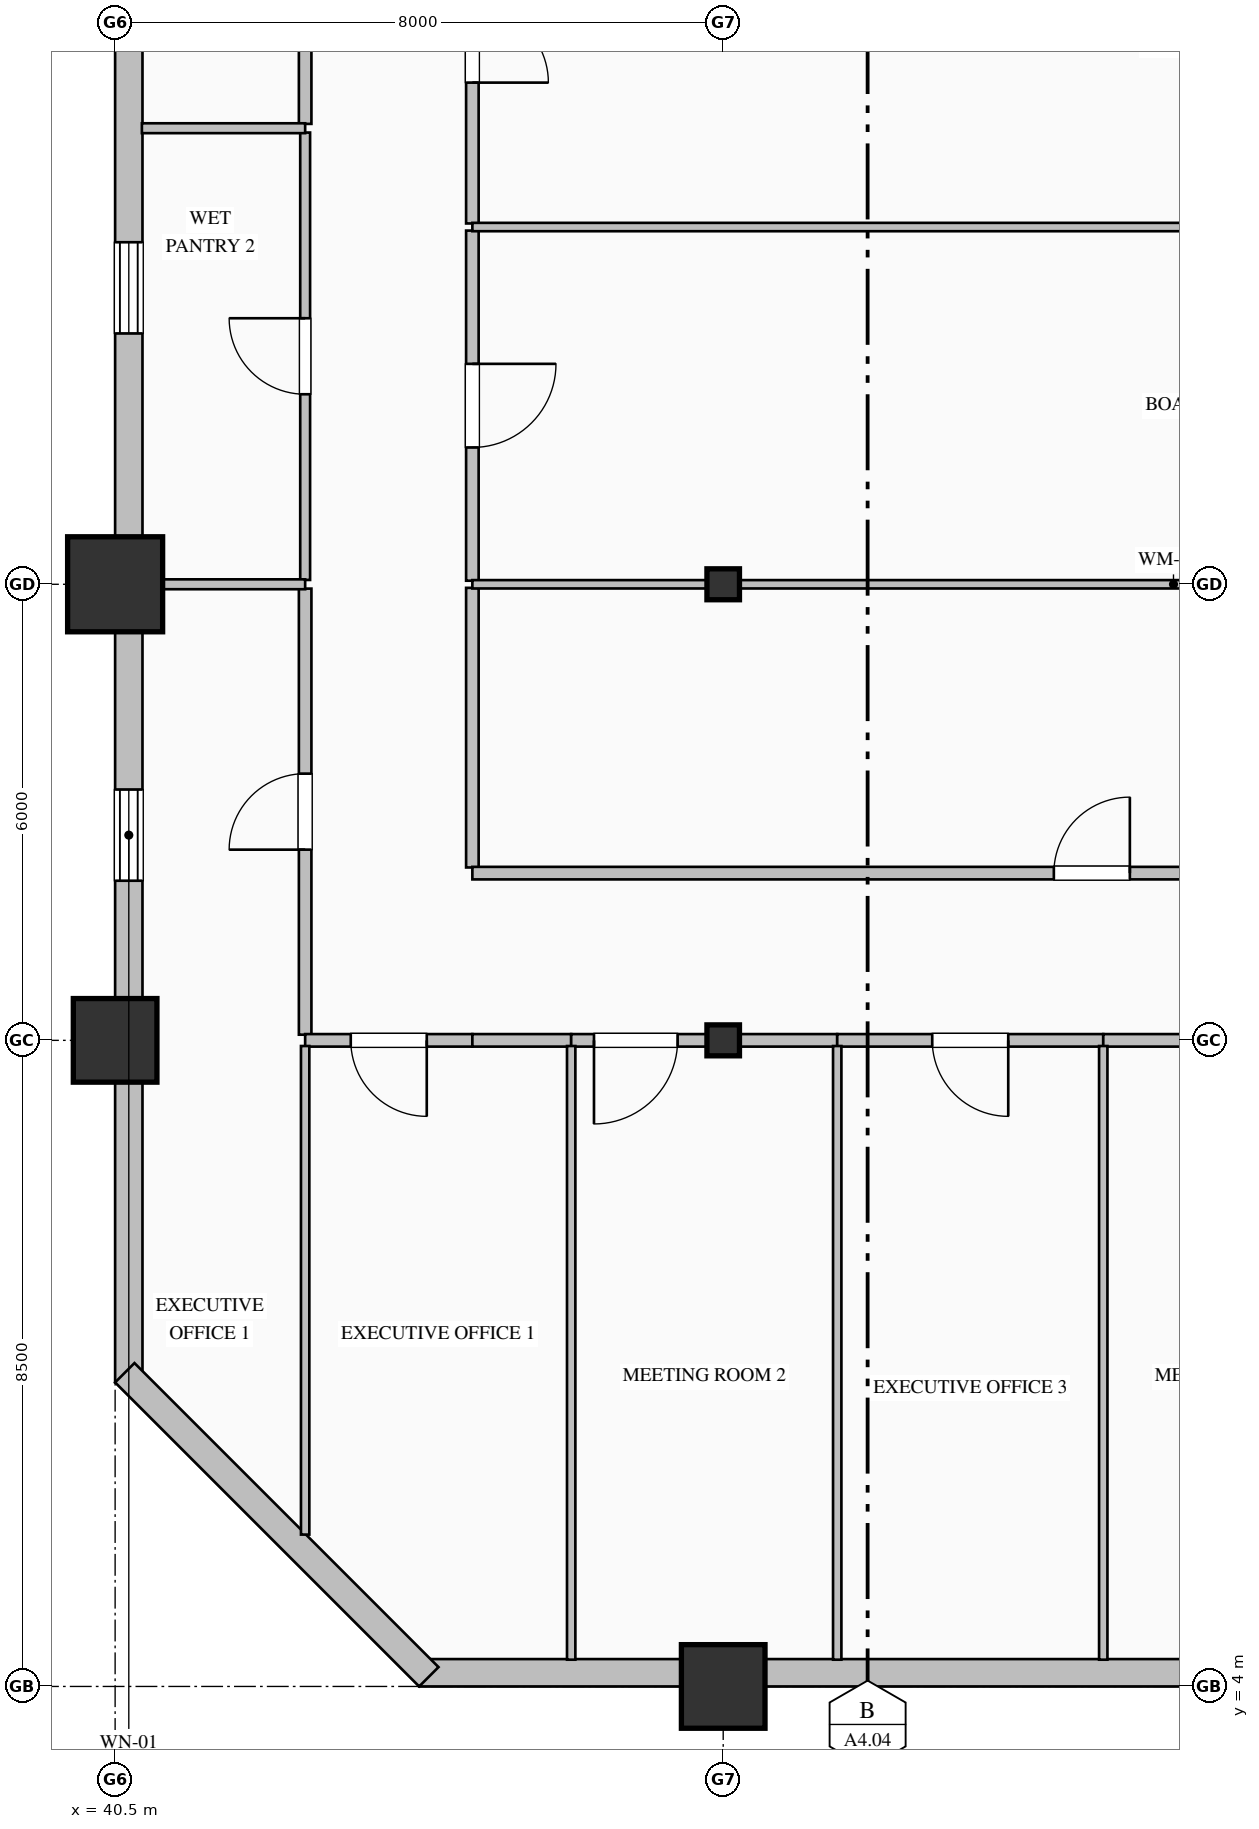
"""IFC4 building model, lengths in metres.
Left out: names, types, materials, properties, quantities, classifications, styles, units other than length and angle.
Written with IfcOpenShell. Run it as: python <this file> out.ifc"""

import sys

from ifc_helpers import new_model, si_unit, direction, frame, frame_2d, origin, origin_2d, place, context, subcontext, project, spatial, rectangle, hollow_rectangle, i_section, extrude, element, fill, save


model = new_model("IFC4")
c1 = context("Model", 3, precision=1e-05, world=origin(), true_north=direction((0.0, 1.0)))
c2 = subcontext(c1, "Body", "Model", "MODEL_VIEW")
j1 = project(units=[si_unit("LENGTHUNIT", "METRE"), si_unit("PLANEANGLEUNIT", "RADIAN")], contexts=[c1])
p1 = place(None, origin())
s1 = spatial("IfcSite", under=j1, at=p1, CompositionType="ELEMENT")
p2 = place(p1, origin())
s2 = spatial("IfcBuilding", under=s1, at=p2, CompositionType="ELEMENT")
p3 = place(p2, frame((0.0, 0.0, 32.2)))
s3 = spatial("IfcBuildingStorey", under=s2, at=p3, CompositionType="ELEMENT", Elevation=32.2)
p4 = place(p3, frame((40.5, 12.5, 0.0), z_axis=(0.0, 0.0, 1.0), x_axis=(1.0, 0.0, 0.0)))
e1 = element("IfcColumn", 1, at=p4, inside=s3, PredefinedType="COLUMN", context=c2, shape_type="SweptSolid", body=[
    extrude(hollow_rectangle(XDim=1.1, YDim=1.1, WallThickness=0.04, at=origin_2d()), origin(), (0.0, 0.0, 1.0), 4.0),
])
p5 = place(p3, frame((40.5, 18.5, 0.0), z_axis=(0.0, 0.0, 1.0), x_axis=(1.0, 0.0, 0.0)))
e2 = element("IfcColumn", 2, at=p5, inside=s3, PredefinedType="COLUMN", context=c2, shape_type="SweptSolid", body=[
    extrude(hollow_rectangle(XDim=1.25, YDim=1.25, WallThickness=0.045, at=origin_2d()), origin(), (0.0, 0.0, 1.0), 4.0),
])
p6 = place(p3, frame((48.5, 4.0, 0.0), z_axis=(0.0, 0.0, 1.0), x_axis=(1.0, 0.0, 0.0)))
e3 = element("IfcColumn", 3, at=p6, inside=s3, PredefinedType="COLUMN", context=c2, shape_type="SweptSolid", body=[
    extrude(hollow_rectangle(XDim=1.1, YDim=1.1, WallThickness=0.04, at=origin_2d()), origin(), (0.0, 0.0, 1.0), 4.0),
])
for number, where, z_axis, x_axis in (
    (4, (48.5, 12.5, 0.0), (0.0, 0.0, 1.0), (1.0, 0.0, 0.0)),
    (5, (48.5, 18.5, 0.0), (0.0, 0.0, 1.0), (1.0, 0.0, 0.0)),
):
    element("IfcColumn", number, at=place(p3, frame(where, z_axis=z_axis, x_axis=x_axis)), inside=s3, PredefinedType="COLUMN", context=c2, shape_type="SweptSolid", body=[
        extrude(i_section(OverallWidth=0.407, OverallDepth=0.428, WebThickness=0.02, FlangeThickness=0.035, FilletRadius=0.022, at=origin_2d()), origin(), (0.0, 0.0, 1.0), 4.0),
    ])
p7 = place(p3, frame((40.68, 8.0, 0.0), z_axis=(0.0, 0.0, 1.0), x_axis=(0.0, 1.0, 0.0)))
e6 = element("IfcWall", 6, at=p7, inside=s3, PredefinedType="SOLIDWALL", context=c2, shape_type="SweptSolid", body=[
    extrude(rectangle(XDim=20.36, YDim=0.36, at=frame_2d((10.18, 0.0))), origin(), (0.0, 0.0, 1.0), 3.05),
])
p8 = place(p7, frame((6.6, 0.0, 0.7)))
e7 = element("IfcOpeningElement", 7, at=p8, cuts=e6, PredefinedType="OPENING", context=c2, shape_type="SweptSolid", body=[
    extrude(rectangle(XDim=1.2, YDim=1.85, at=frame_2d((0.6, 0.925))), frame((0.0, 0.19, 0.0), z_axis=(0.0, -1.0, 0.0), x_axis=(1.0, 0.0, 0.0)), (0.0, 0.0, 1.0), 0.38),
])
p9 = place(p7, frame((13.8, 0.0, 0.7)))
e8 = element("IfcOpeningElement", 8, at=p9, cuts=e6, PredefinedType="OPENING", context=c2, shape_type="SweptSolid", body=[
    extrude(rectangle(XDim=1.2, YDim=1.85, at=frame_2d((0.6, 0.925))), frame((0.0, 0.19, 0.0), z_axis=(0.0, -1.0, 0.0), x_axis=(1.0, 0.0, 0.0)), (0.0, 0.0, 1.0), 0.38),
])
p10 = place(p3, frame((60.0, 4.18, 0.0), z_axis=(0.0, 0.0, 1.0), x_axis=(-1.0, 0.0, 0.0)))
e9 = element("IfcWall", 9, at=p10, inside=s3, PredefinedType="SOLIDWALL", context=c2, shape_type="SweptSolid", body=[
    extrude(rectangle(XDim=15.5, YDim=0.36, at=frame_2d((7.75, 0.0))), origin(), (0.0, 0.0, 1.0), 3.25),
])
p11 = place(p3, frame((44.627, 4.127, 0.0), z_axis=(0.0, 0.0, 1.0), x_axis=(-0.707106781187, 0.707106781187, 0.0)))
e10 = element("IfcWall", 10, at=p11, inside=s3, PredefinedType="SOLIDWALL", context=c2, shape_type="SweptSolid", body=[
    extrude(rectangle(XDim=5.657, YDim=0.36, at=frame_2d((2.828, 0.0))), origin(), (0.0, 0.0, 1.0), 3.75),
])
p12 = place(p3, frame((45.2, 18.453, 0.0), z_axis=(0.0, 0.0, 1.0), x_axis=(0.0, -1.0, 0.0)))
e11 = element("IfcWall", 11, at=p12, inside=s3, PredefinedType="PARTITIONING", context=c2, shape_type="SweptSolid", body=[
    extrude(rectangle(XDim=3.678, YDim=0.165, at=frame_2d((1.839, 0.0))), origin(), (0.0, 0.0, 1.0), 3.75),
])
p13 = place(p3, frame((45.2, 23.153, 0.0), z_axis=(0.0, 0.0, 1.0), x_axis=(0.0, -1.0, 0.0)))
e12 = element("IfcWall", 12, at=p13, inside=s3, PredefinedType="PARTITIONING", context=c2, shape_type="SweptSolid", body=[
    extrude(rectangle(XDim=4.606, YDim=0.165, at=frame_2d((2.303, 0.0))), origin(), (0.0, 0.0, 1.0), 3.75),
])
p14 = place(p13, frame((1.753, 0.0, 0.0)))
e13 = element("IfcOpeningElement", 13, at=p14, cuts=e12, PredefinedType="OPENING", context=c2, shape_type="SweptSolid", body=[
    extrude(rectangle(XDim=1.1, YDim=2.2, at=frame_2d((0.55, 1.1))), frame((0.0, 0.093, 0.0), z_axis=(0.0, -1.0, 0.0), x_axis=(1.0, 0.0, 0.0)), (0.0, 0.0, 1.0), 0.185),
])
p15 = place(p3, frame((45.2, 27.953, 0.0), z_axis=(0.0, 0.0, 1.0), x_axis=(0.0, -1.0, 0.0)))
e14 = element("IfcWall", 14, at=p15, inside=s3, PredefinedType="PARTITIONING", context=c2, shape_type="SweptSolid", body=[
    extrude(rectangle(XDim=4.706, YDim=0.165, at=frame_2d((2.353, 0.0))), origin(), (0.0, 0.0, 1.0), 3.75),
])
p16 = place(p15, frame((1.853, 0.0, 0.0)))
e15 = element("IfcOpeningElement", 15, at=p16, cuts=e14, PredefinedType="OPENING", context=c2, shape_type="SweptSolid", body=[
    extrude(rectangle(XDim=1.0, YDim=2.15, at=frame_2d((0.5, 1.075))), frame((0.0, 0.093, 0.0), z_axis=(0.0, -1.0, 0.0), x_axis=(1.0, 0.0, 0.0)), (0.0, 0.0, 1.0), 0.185),
])
p17 = place(p3, frame((43.0, 12.574, 0.0), z_axis=(0.0, 0.0, 1.0), x_axis=(0.0, 1.0, 0.0)))
e16 = element("IfcWall", 16, at=p17, inside=s3, PredefinedType="PARTITIONING", context=c2, shape_type="SweptSolid", body=[
    extrude(rectangle(XDim=5.869, YDim=0.165, at=frame_2d((2.934, 0.0))), origin(), (0.0, 0.0, 1.0), 3.75),
])
p18 = place(p17, frame((2.434, 0.0, 0.0)))
e17 = element("IfcOpeningElement", 17, at=p18, cuts=e16, PredefinedType="OPENING", context=c2, shape_type="SweptSolid", body=[
    extrude(rectangle(XDim=1.0, YDim=2.15, at=frame_2d((0.5, 1.075))), frame((0.0, 0.093, 0.0), z_axis=(0.0, -1.0, 0.0), x_axis=(1.0, 0.0, 0.0)), (0.0, 0.0, 1.0), 0.185),
])
p19 = place(p3, frame((43.0, 18.557, 0.0), z_axis=(0.0, 0.0, 1.0), x_axis=(0.0, 1.0, 0.0)))
e18 = element("IfcWall", 18, at=p19, inside=s3, PredefinedType="PARTITIONING", context=c2, shape_type="SweptSolid", body=[
    extrude(rectangle(XDim=5.886, YDim=0.13, at=frame_2d((2.943, 0.0))), origin(), (0.0, 0.0, 1.0), 3.75),
])
p20 = place(p19, frame((2.443, 0.0, 0.0)))
e19 = element("IfcOpeningElement", 19, at=p20, cuts=e18, PredefinedType="OPENING", context=c2, shape_type="SweptSolid", body=[
    extrude(rectangle(XDim=1.0, YDim=2.15, at=frame_2d((0.5, 1.075))), frame((0.0, 0.075, 0.0), z_axis=(0.0, -1.0, 0.0), x_axis=(1.0, 0.0, 0.0)), (0.0, 0.0, 1.0), 0.15),
])
p21 = place(p3, frame((43.0, 24.557, 0.0), z_axis=(0.0, 0.0, 1.0), x_axis=(0.0, 1.0, 0.0)))
e20 = element("IfcWall", 20, at=p21, inside=s3, PredefinedType="PARTITIONING", context=c2, shape_type="SweptSolid", body=[
    extrude(rectangle(XDim=3.396, YDim=0.165, at=frame_2d((1.698, 0.0))), origin(), (0.0, 0.0, 1.0), 3.75),
])
p22 = place(p21, frame((1.198, 0.0, 0.0)))
e21 = element("IfcOpeningElement", 21, at=p22, cuts=e20, PredefinedType="OPENING", context=c2, shape_type="SweptSolid", body=[
    extrude(rectangle(XDim=1.0, YDim=2.15, at=frame_2d((0.5, 1.075))), frame((0.0, 0.093, 0.0), z_axis=(0.0, -1.0, 0.0), x_axis=(1.0, 0.0, 0.0)), (0.0, 0.0, 1.0), 0.185),
])
p23 = place(p3, frame((45.2, 12.5, 0.0), z_axis=(0.0, 0.0, 1.0), x_axis=(-1.0, 0.0, 0.0)))
e22 = element("IfcWall", 22, at=p23, inside=s3, PredefinedType="PARTITIONING", context=c2, shape_type="SweptSolid", body=[
    extrude(rectangle(XDim=2.2, YDim=0.165, at=frame_2d((1.1, 0.0))), origin(), (0.0, 0.0, 1.0), 3.042),
])
p24 = place(p23, frame((0.6, 0.0, 0.0)))
e23 = element("IfcOpeningElement", 23, at=p24, cuts=e22, PredefinedType="OPENING", context=c2, shape_type="SweptSolid", body=[
    extrude(rectangle(XDim=1.0, YDim=2.15, at=frame_2d((0.5, 1.075))), frame((0.0, 0.093, 0.0), z_axis=(0.0, -1.0, 0.0), x_axis=(1.0, 0.0, 0.0)), (0.0, 0.0, 1.0), 0.185),
])
p25 = place(p3, frame((45.2, 14.7, 0.0), z_axis=(0.0, 0.0, 1.0), x_axis=(1.0, 0.0, 0.0)))
e24 = element("IfcWall", 24, at=p25, inside=s3, PredefinedType="PARTITIONING", context=c2, shape_type="SweptSolid", body=[
    extrude(rectangle(XDim=16.3, YDim=0.165, at=frame_2d((8.15, 0.0))), origin(), (0.0, 0.0, 1.0), 3.75),
])
p26 = place(p25, frame((7.65, 0.0, 0.0)))
e25 = element("IfcOpeningElement", 25, at=p26, cuts=e24, PredefinedType="OPENING", context=c2, shape_type="SweptSolid", body=[
    extrude(rectangle(XDim=1.0, YDim=2.15, at=frame_2d((0.5, 1.075))), frame((0.0, 0.093, 0.0), z_axis=(0.0, -1.0, 0.0), x_axis=(1.0, 0.0, 0.0)), (0.0, 0.0, 1.0), 0.185),
])
p27 = place(p3, frame((46.5, 12.5, 0.0), z_axis=(0.0, 0.0, 1.0), x_axis=(-1.0, 0.0, 0.0)))
e26 = element("IfcWall", 26, at=p27, inside=s3, PredefinedType="PARTITIONING", context=c2, shape_type="SweptSolid", body=[
    extrude(rectangle(XDim=1.3, YDim=0.165, at=frame_2d((0.65, 0.0))), origin(), (0.0, 0.0, 1.0), 3.042),
])
p28 = place(p3, frame((50.0, 12.5, 0.0), z_axis=(0.0, 0.0, 1.0), x_axis=(-1.0, 0.0, 0.0)))
e27 = element("IfcWall", 27, at=p28, inside=s3, PredefinedType="PARTITIONING", context=c2, shape_type="SweptSolid", body=[
    extrude(rectangle(XDim=3.5, YDim=0.165, at=frame_2d((1.75, 0.0))), origin(), (0.0, 0.0, 1.0), 3.042),
])
p29 = place(p28, frame((2.1, 0.0, 0.0)))
e28 = element("IfcOpeningElement", 28, at=p29, cuts=e27, PredefinedType="OPENING", context=c2, shape_type="SweptSolid", body=[
    extrude(rectangle(XDim=1.1, YDim=2.2, at=frame_2d((0.55, 1.1))), frame((0.0, 0.093, 0.0), z_axis=(0.0, -1.0, 0.0), x_axis=(1.0, 0.0, 0.0)), (0.0, 0.0, 1.0), 0.185),
])
p30 = place(p3, frame((53.5, 12.5, 0.0), z_axis=(0.0, 0.0, 1.0), x_axis=(-1.0, 0.0, 0.0)))
e29 = element("IfcWall", 29, at=p30, inside=s3, PredefinedType="PARTITIONING", context=c2, shape_type="SweptSolid", body=[
    extrude(rectangle(XDim=3.5, YDim=0.165, at=frame_2d((1.75, 0.0))), origin(), (0.0, 0.0, 1.0), 3.042),
])
p31 = place(p30, frame((1.25, 0.0, 0.0)))
e30 = element("IfcOpeningElement", 30, at=p31, cuts=e29, PredefinedType="OPENING", context=c2, shape_type="SweptSolid", body=[
    extrude(rectangle(XDim=1.0, YDim=2.15, at=frame_2d((0.5, 1.075))), frame((0.0, 0.093, 0.0), z_axis=(0.0, -1.0, 0.0), x_axis=(1.0, 0.0, 0.0)), (0.0, 0.0, 1.0), 0.185),
])
p32 = place(p3, frame((57.0, 12.5, 0.0), z_axis=(0.0, 0.0, 1.0), x_axis=(-1.0, 0.0, 0.0)))
e31 = element("IfcWall", 31, at=p32, inside=s3, PredefinedType="PARTITIONING", context=c2, shape_type="SweptSolid", body=[
    extrude(rectangle(XDim=3.5, YDim=0.165, at=frame_2d((1.75, 0.0))), origin(), (0.0, 0.0, 1.0), 3.042),
])
p33 = place(p32, frame((1.2, 0.0, 0.0)))
e32 = element("IfcOpeningElement", 32, at=p33, cuts=e31, PredefinedType="OPENING", context=c2, shape_type="SweptSolid", body=[
    extrude(rectangle(XDim=1.1, YDim=2.2, at=frame_2d((0.55, 1.1))), frame((0.0, 0.093, 0.0), z_axis=(0.0, -1.0, 0.0), x_axis=(1.0, 0.0, 0.0)), (0.0, 0.0, 1.0), 0.185),
])
p34 = place(p3, frame((45.2, 18.5, 0.0), z_axis=(0.0, 0.0, 1.0), x_axis=(1.0, 0.0, 0.0)))
e33 = element("IfcWall", 33, at=p34, inside=s3, PredefinedType="MOVABLE", context=c2, shape_type="SweptSolid", body=[
    extrude(rectangle(XDim=18.448, YDim=0.11, at=frame_2d((9.224, 0.0))), origin(), (0.0, 0.0, 1.0), 3.042),
])
p35 = place(p3, frame((45.2, 23.2, 0.0), z_axis=(0.0, 0.0, 1.0), x_axis=(1.0, 0.0, 0.0)))
e34 = element("IfcWall", 34, at=p35, inside=s3, PredefinedType="MOVABLE", context=c2, shape_type="SweptSolid", body=[
    extrude(rectangle(XDim=18.448, YDim=0.11, at=frame_2d((9.224, 0.0))), origin(), (0.0, 0.0, 1.0), 3.342),
])
p36 = place(p3, frame((40.852, 18.5, 0.0), z_axis=(0.0, 0.0, 1.0), x_axis=(1.0, 0.0, 0.0)))
e35 = element("IfcWall", 35, at=p36, inside=s3, PredefinedType="PARTITIONING", context=c2, shape_type="SweptSolid", body=[
    extrude(rectangle(XDim=2.148, YDim=0.13, at=frame_2d((1.074, 0.0))), origin(), (0.0, 0.0, 1.0), 3.042),
])
p37 = place(p3, frame((43.0, 12.426, 0.0), z_axis=(0.0, 0.0, 1.0), x_axis=(0.0, -1.0, 0.0)))
e36 = element("IfcWall", 36, at=p37, inside=s3, PredefinedType="MOVABLE", context=c2, shape_type="SweptSolid", body=[
    extrude(rectangle(XDim=6.428, YDim=0.11, at=frame_2d((3.214, 0.0))), origin(), (0.0, 0.0, 1.0), 3.75),
])
p38 = place(p3, frame((40.852, 24.5, 0.0), z_axis=(0.0, 0.0, 1.0), x_axis=(1.0, 0.0, 0.0)))
e37 = element("IfcWall", 37, at=p38, inside=s3, PredefinedType="PARTITIONING", context=c2, shape_type="SweptSolid", body=[
    extrude(rectangle(XDim=2.148, YDim=0.13, at=frame_2d((1.074, 0.0))), origin(), (0.0, 0.0, 1.0), 3.75),
])
for number, where, z_axis, x_axis in (
    (38, (46.5, 12.426, 0.0), (0.0, 0.0, 1.0), (0.0, -1.0, 0.0)),
    (39, (50.0, 12.426, 0.0), (0.0, 0.0, 1.0), (0.0, -1.0, 0.0)),
    (40, (53.5, 12.426, 0.0), (0.0, 0.0, 1.0), (0.0, -1.0, 0.0)),
):
    element("IfcWall", number, at=place(p3, frame(where, z_axis=z_axis, x_axis=x_axis)), inside=s3, PredefinedType="MOVABLE", context=c2, shape_type="SweptSolid", body=[
        extrude(rectangle(XDim=8.073, YDim=0.11, at=frame_2d((4.037, 0.0))), origin(), (0.0, 0.0, 1.0), 3.75),
    ])
p39 = place(p8, origin())
e41 = element("IfcWindow", 41, at=p39, inside=s3, PartitioningType="DOUBLE_PANEL_VERTICAL", PredefinedType="WINDOW", context=c2, shape_type="SweptSolid", body=[
    extrude(rectangle(XDim=1.2, YDim=1.85, at=frame_2d((0.6, 0.925))), frame((0.0, 0.15, 0.0), z_axis=(0.0, -1.0, 0.0), x_axis=(1.0, 0.0, 0.0)), (0.0, 0.0, 1.0), 0.06),
])
fill(e7, e41)
p40 = place(p9, origin())
e42 = element("IfcWindow", 42, at=p40, inside=s3, PartitioningType="DOUBLE_PANEL_VERTICAL", PredefinedType="WINDOW", context=c2, shape_type="SweptSolid", body=[
    extrude(rectangle(XDim=1.2, YDim=1.85, at=frame_2d((0.6, 0.925))), frame((0.0, 0.15, 0.0), z_axis=(0.0, -1.0, 0.0), x_axis=(1.0, 0.0, 0.0)), (0.0, 0.0, 1.0), 0.06),
])
fill(e8, e42)
p41 = place(p26, origin())
e43 = element("IfcDoor", 43, at=p41, inside=s3, OperationType="SINGLE_SWING_RIGHT", PredefinedType="DOOR", context=c2, shape_type="SweptSolid", body=[
    extrude(rectangle(XDim=1.0, YDim=2.15, at=frame_2d((0.5, 1.075))), frame((0.0, 0.025, 0.0), z_axis=(0.0, -1.0, 0.0), x_axis=(1.0, 0.0, 0.0)), (0.0, 0.0, 1.0), 0.05),
])
fill(e25, e43)
p42 = place(p14, origin())
e44 = element("IfcDoor", 44, at=p42, inside=s3, OperationType="SINGLE_SWING_LEFT", PredefinedType="DOOR", context=c2, shape_type="SweptSolid", body=[
    extrude(rectangle(XDim=1.1, YDim=2.2, at=frame_2d((0.55, 1.1))), frame((0.0, 0.025, 0.0), z_axis=(0.0, -1.0, 0.0), x_axis=(1.0, 0.0, 0.0)), (0.0, 0.0, 1.0), 0.05),
])
fill(e13, e44)
p43 = place(p16, origin())
e45 = element("IfcDoor", 45, at=p43, inside=s3, OperationType="SINGLE_SWING_RIGHT", PredefinedType="DOOR", context=c2, shape_type="SweptSolid", body=[
    extrude(rectangle(XDim=1.0, YDim=2.15, at=frame_2d((0.5, 1.075))), frame((0.0, 0.025, 0.0), z_axis=(0.0, -1.0, 0.0), x_axis=(1.0, 0.0, 0.0)), (0.0, 0.0, 1.0), 0.05),
])
fill(e15, e45)
p44 = place(p18, origin())
e46 = element("IfcDoor", 46, at=p44, inside=s3, OperationType="SINGLE_SWING_LEFT", PredefinedType="DOOR", context=c2, shape_type="SweptSolid", body=[
    extrude(rectangle(XDim=1.0, YDim=2.15, at=frame_2d((0.5, 1.075))), frame((0.0, 0.025, 0.0), z_axis=(0.0, -1.0, 0.0), x_axis=(1.0, 0.0, 0.0)), (0.0, 0.0, 1.0), 0.05),
])
fill(e17, e46)
p45 = place(p20, origin())
e47 = element("IfcDoor", 47, at=p45, inside=s3, OperationType="SINGLE_SWING_RIGHT", PredefinedType="DOOR", context=c2, shape_type="SweptSolid", body=[
    extrude(rectangle(XDim=1.0, YDim=2.15, at=frame_2d((0.5, 1.075))), frame((0.0, 0.025, 0.0), z_axis=(0.0, -1.0, 0.0), x_axis=(1.0, 0.0, 0.0)), (0.0, 0.0, 1.0), 0.05),
])
fill(e19, e47)
p46 = place(p24, origin())
e48 = element("IfcDoor", 48, at=p46, inside=s3, OperationType="SINGLE_SWING_LEFT", PredefinedType="DOOR", context=c2, shape_type="SweptSolid", body=[
    extrude(rectangle(XDim=1.0, YDim=2.15, at=frame_2d((0.5, 1.075))), frame((0.0, 0.025, 0.0), z_axis=(0.0, -1.0, 0.0), x_axis=(1.0, 0.0, 0.0)), (0.0, 0.0, 1.0), 0.05),
])
fill(e23, e48)
p47 = place(p29, origin())
e49 = element("IfcDoor", 49, at=p47, inside=s3, OperationType="SINGLE_SWING_RIGHT", PredefinedType="DOOR", context=c2, shape_type="SweptSolid", body=[
    extrude(rectangle(XDim=1.1, YDim=2.2, at=frame_2d((0.55, 1.1))), frame((0.0, 0.025, 0.0), z_axis=(0.0, -1.0, 0.0), x_axis=(1.0, 0.0, 0.0)), (0.0, 0.0, 1.0), 0.05),
])
fill(e28, e49)
p48 = place(p31, origin())
e50 = element("IfcDoor", 50, at=p48, inside=s3, OperationType="SINGLE_SWING_LEFT", PredefinedType="DOOR", context=c2, shape_type="SweptSolid", body=[
    extrude(rectangle(XDim=1.0, YDim=2.15, at=frame_2d((0.5, 1.075))), frame((0.0, 0.025, 0.0), z_axis=(0.0, -1.0, 0.0), x_axis=(1.0, 0.0, 0.0)), (0.0, 0.0, 1.0), 0.05),
])
fill(e30, e50)
save(model, sys.argv[1])
